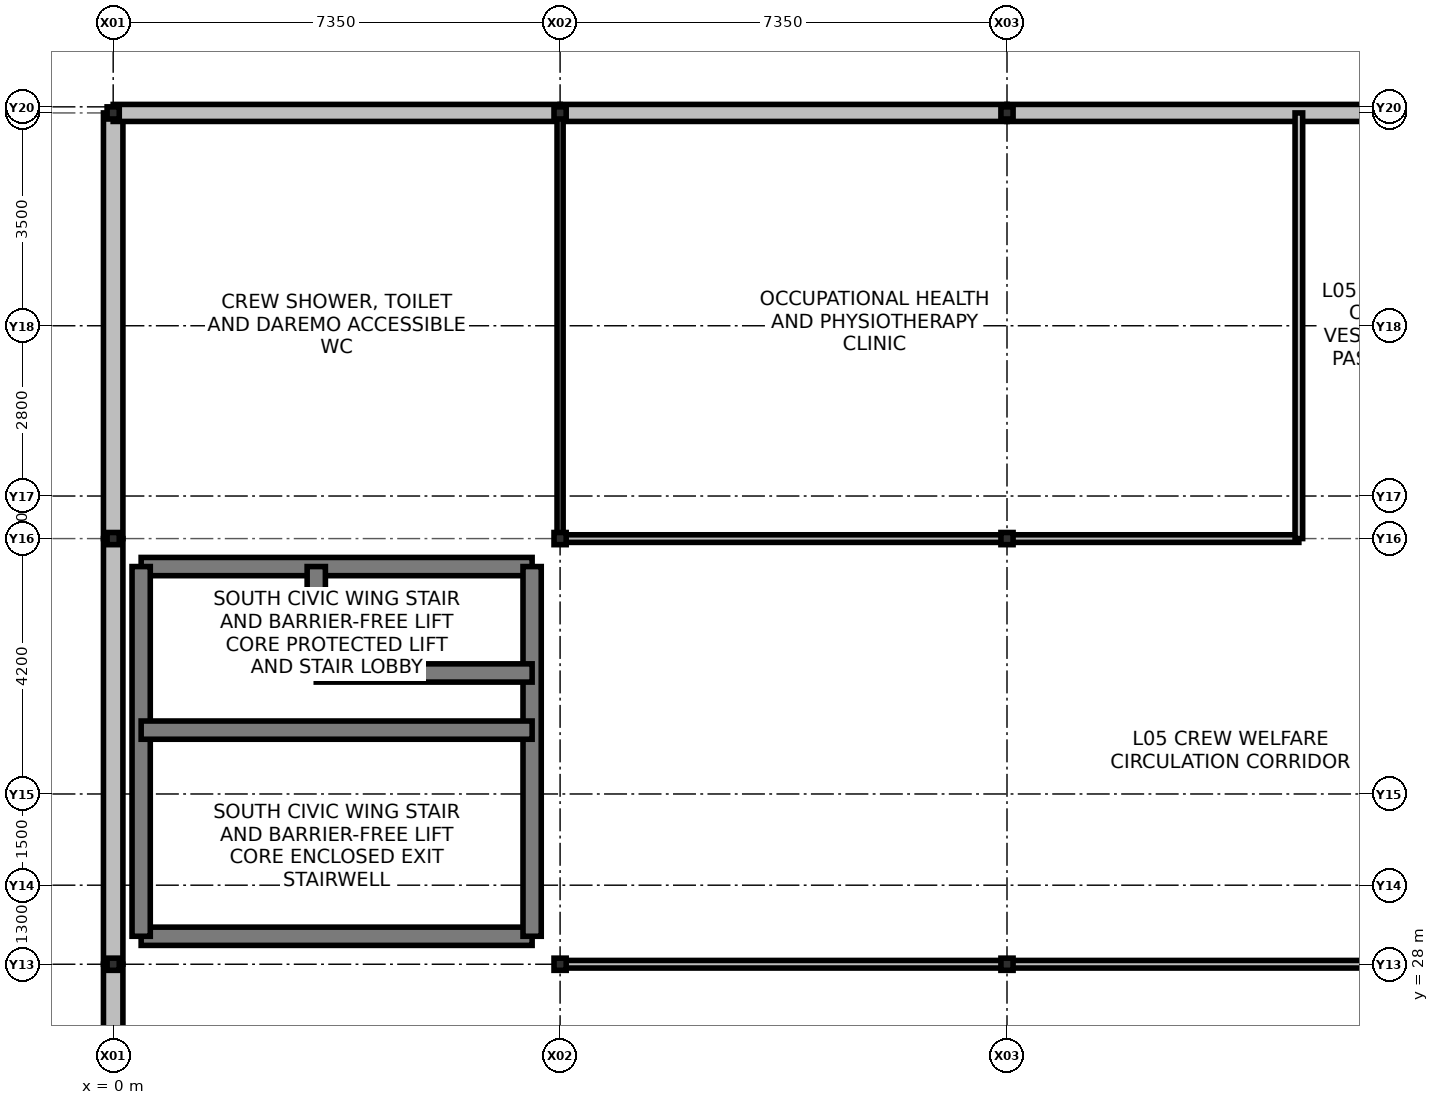
"""IFC4 building model, lengths in metres.
Left out: names, types, materials, properties, quantities, classifications, styles, units other than length and angle.
Written with IfcOpenShell. Run it as: python <this file> out.ifc"""

import sys

from ifc_helpers import new_model, si_unit, direction, frame, frame_2d, origin, origin_2d, place, context, subcontext, project, spatial, rectangle, i_section, extrude, element, fill, save


model = new_model("IFC4")
c1 = context("Model", 3, precision=1e-05, world=origin(), true_north=direction((0.0, 1.0)))
c2 = subcontext(c1, "Body", "Model", "MODEL_VIEW")
j1 = project(units=[si_unit("LENGTHUNIT", "METRE"), si_unit("PLANEANGLEUNIT", "RADIAN")], contexts=[c1])
p1 = place(None, origin())
s1 = spatial("IfcSite", under=j1, at=p1, CompositionType="ELEMENT")
p2 = place(p1, origin())
s2 = spatial("IfcBuilding", under=s1, at=p2, CompositionType="ELEMENT")
p3 = place(p2, frame((0.0, 0.0, 19.5)))
s3 = spatial("IfcBuildingStorey", under=s2, at=p3, CompositionType="ELEMENT", Elevation=19.5)
for number, where, z_axis, x_axis in (
    (1, (0.0, 28.0, 0.0), (0.0, 0.0, 1.0), (1.0, 0.0, 0.0)),
    (2, (0.0, 35.0, 0.0), (0.0, 0.0, 1.0), (1.0, 0.0, 0.0)),
    (3, (0.0, 42.0, 0.0), (0.0, 0.0, 1.0), (1.0, 0.0, 0.0)),
    (4, (7.35, 28.0, 0.0), (0.0, 0.0, 1.0), (1.0, 0.0, 0.0)),
    (5, (7.35, 35.0, 0.0), (0.0, 0.0, 1.0), (1.0, 0.0, 0.0)),
    (6, (7.35, 42.0, 0.0), (0.0, 0.0, 1.0), (1.0, 0.0, 0.0)),
    (7, (14.7, 28.0, 0.0), (0.0, 0.0, 1.0), (1.0, 0.0, 0.0)),
    (8, (14.7, 35.0, 0.0), (0.0, 0.0, 1.0), (1.0, 0.0, 0.0)),
    (9, (14.7, 42.0, 0.0), (0.0, 0.0, 1.0), (1.0, 0.0, 0.0)),
):
    element("IfcColumn", number, at=place(p3, frame(where, z_axis=z_axis, x_axis=x_axis)), inside=s3, PredefinedType="COLUMN", context=c2, shape_type="SweptSolid", body=[
        extrude(i_section(OverallWidth=0.2, OverallDepth=0.2, WebThickness=0.008, FlangeThickness=0.012, at=origin_2d()), origin(), (0.0, 0.0, 1.0), 4.2),
    ])
p4 = place(p3, frame((0.0, 21.0, 0.0), z_axis=(0.0, 0.0, 1.0), x_axis=(0.0, 1.0, 0.0)))
e10 = element("IfcWall", 10, at=p4, inside=s3, PredefinedType="SOLIDWALL", context=c2, shape_type="SweptSolid", body=[
    extrude(rectangle(XDim=7.0, YDim=0.32, at=frame_2d((3.5, 0.0))), origin(), (0.0, 0.0, 1.0), 3.48),
])
p5 = place(p4, frame((2.2, 0.0, 0.9)))
e11 = element("IfcOpeningElement", 11, at=p5, cuts=e10, PredefinedType="OPENING", context=c2, shape_type="SweptSolid", body=[
    extrude(rectangle(XDim=2.1, YDim=2.1, at=frame_2d((1.05, 1.05))), frame((0.0, 0.17, 0.0), z_axis=(0.0, -1.0, 0.0), x_axis=(1.0, 0.0, 0.0)), (0.0, 0.0, 1.0), 0.34),
])
p6 = place(p3, frame((0.0, 28.0, 0.0), z_axis=(0.0, 0.0, 1.0), x_axis=(0.0, 1.0, 0.0)))
e12 = element("IfcWall", 12, at=p6, inside=s3, PredefinedType="SOLIDWALL", context=c2, shape_type="SweptSolid", body=[
    extrude(rectangle(XDim=7.0, YDim=0.32, at=frame_2d((3.5, 0.0))), origin(), (0.0, 0.0, 1.0), 3.48),
])
p7 = place(p6, frame((2.2, 0.0, 0.9)))
e13 = element("IfcOpeningElement", 13, at=p7, cuts=e12, PredefinedType="OPENING", context=c2, shape_type="SweptSolid", body=[
    extrude(rectangle(XDim=3.0, YDim=1.8, at=frame_2d((1.5, 0.9))), frame((0.0, 0.17, 0.0), z_axis=(0.0, -1.0, 0.0), x_axis=(1.0, 0.0, 0.0)), (0.0, 0.0, 1.0), 0.34),
])
p8 = place(p3, frame((0.0, 35.0, 0.0), z_axis=(0.0, 0.0, 1.0), x_axis=(0.0, 1.0, 0.0)))
e14 = element("IfcWall", 14, at=p8, inside=s3, PredefinedType="SOLIDWALL", context=c2, shape_type="SweptSolid", body=[
    extrude(rectangle(XDim=7.0, YDim=0.32, at=frame_2d((3.5, 0.0))), origin(), (0.0, 0.0, 1.0), 3.48),
])
p9 = place(p8, frame((2.2, 0.0, 0.9)))
e15 = element("IfcOpeningElement", 15, at=p9, cuts=e14, PredefinedType="OPENING", context=c2, shape_type="SweptSolid", body=[
    extrude(rectangle(XDim=1.65, YDim=1.95, at=frame_2d((0.825, 0.975))), frame((0.0, 0.17, 0.0), z_axis=(0.0, -1.0, 0.0), x_axis=(1.0, 0.0, 0.0)), (0.0, 0.0, 1.0), 0.34),
])
p10 = place(p3, frame((0.0, 42.0, 0.0), z_axis=(0.0, 0.0, 1.0), x_axis=(1.0, 0.0, 0.0)))
e16 = element("IfcWall", 16, at=p10, inside=s3, PredefinedType="SOLIDWALL", context=c2, shape_type="SweptSolid", body=[
    extrude(rectangle(XDim=7.35, YDim=0.28, at=frame_2d((3.675, 0.0))), origin(), (0.0, 0.0, 1.0), 3.48),
])
p11 = place(p10, frame((2.4, 0.0, 0.9)))
e17 = element("IfcOpeningElement", 17, at=p11, cuts=e16, PredefinedType="OPENING", context=c2, shape_type="SweptSolid", body=[
    extrude(rectangle(XDim=2.4, YDim=2.1, at=frame_2d((1.2, 1.05))), frame((0.0, 0.15, 0.0), z_axis=(0.0, -1.0, 0.0), x_axis=(1.0, 0.0, 0.0)), (0.0, 0.0, 1.0), 0.3),
])
p12 = place(p3, frame((7.35, 42.0, 0.0), z_axis=(0.0, 0.0, 1.0), x_axis=(1.0, 0.0, 0.0)))
e18 = element("IfcWall", 18, at=p12, inside=s3, PredefinedType="SOLIDWALL", context=c2, shape_type="SweptSolid", body=[
    extrude(rectangle(XDim=7.35, YDim=0.28, at=frame_2d((3.675, 0.0))), origin(), (0.0, 0.0, 1.0), 3.48),
])
p13 = place(p12, frame((2.4, 0.0, 0.9)))
e19 = element("IfcOpeningElement", 19, at=p13, cuts=e18, PredefinedType="OPENING", context=c2, shape_type="SweptSolid", body=[
    extrude(rectangle(XDim=2.6, YDim=2.0, at=frame_2d((1.3, 1.0))), frame((0.0, 0.15, 0.0), z_axis=(0.0, -1.0, 0.0), x_axis=(1.0, 0.0, 0.0)), (0.0, 0.0, 1.0), 0.3),
])
p14 = place(p3, frame((14.7, 42.0, 0.0), z_axis=(0.0, 0.0, 1.0), x_axis=(1.0, 0.0, 0.0)))
e20 = element("IfcWall", 20, at=p14, inside=s3, PredefinedType="SOLIDWALL", context=c2, shape_type="SweptSolid", body=[
    extrude(rectangle(XDim=7.35, YDim=0.28, at=frame_2d((3.675, 0.0))), origin(), (0.0, 0.0, 1.0), 3.48),
])
p15 = place(p14, frame((1.4, 0.0, 0.9)))
e21 = element("IfcOpeningElement", 21, at=p15, cuts=e20, PredefinedType="OPENING", context=c2, shape_type="SweptSolid", body=[
    extrude(rectangle(XDim=2.8, YDim=2.1, at=frame_2d((1.4, 1.05))), frame((0.0, 0.15, 0.0), z_axis=(0.0, -1.0, 0.0), x_axis=(1.0, 0.0, 0.0)), (0.0, 0.0, 1.0), 0.3),
])
p16 = place(p3, frame((0.46, 28.46, 0.0), z_axis=(0.0, 0.0, 1.0), x_axis=(1.0, 0.0, 0.0)))
e22 = element("IfcWall", 22, at=p16, inside=s3, PredefinedType="SHEAR", context=c2, shape_type="SweptSolid", body=[
    extrude(rectangle(XDim=6.43, YDim=0.3, at=frame_2d((3.215, 0.0))), origin(), (0.0, 0.0, 1.0), 3.92),
])
p17 = place(p3, frame((0.46, 34.54, 0.0), z_axis=(0.0, 0.0, 1.0), x_axis=(1.0, 0.0, 0.0)))
e23 = element("IfcWall", 23, at=p17, inside=s3, PredefinedType="SHEAR", context=c2, shape_type="SweptSolid", body=[
    extrude(rectangle(XDim=6.43, YDim=0.3, at=frame_2d((3.215, 0.0))), origin(), (0.0, 0.0, 1.0), 3.92),
])
p18 = place(p17, frame((0.55, 0.0, 0.0)))
e24 = element("IfcOpeningElement", 24, at=p18, cuts=e23, PredefinedType="OPENING", context=c2, shape_type="SweptSolid", body=[
    extrude(rectangle(XDim=1.5, YDim=2.2, at=frame_2d((0.75, 1.1))), frame((0.0, 0.16, 0.0), z_axis=(0.0, -1.0, 0.0), x_axis=(1.0, 0.0, 0.0)), (0.0, 0.0, 1.0), 0.32),
])
for number, where, z_axis, x_axis in (
    (25, (0.46, 28.46, 0.0), (0.0, 0.0, 1.0), (0.0, 1.0, 0.0)),
    (26, (6.89, 28.46, 0.0), (0.0, 0.0, 1.0), (0.0, 1.0, 0.0)),
):
    element("IfcWall", number, at=place(p3, frame(where, z_axis=z_axis, x_axis=x_axis)), inside=s3, PredefinedType="SHEAR", context=c2, shape_type="SweptSolid", body=[
        extrude(rectangle(XDim=6.08, YDim=0.3, at=frame_2d((3.04, 0.0))), origin(), (0.0, 0.0, 1.0), 3.92),
    ])
p19 = place(p3, frame((0.46, 31.85, 0.0), z_axis=(0.0, 0.0, 1.0), x_axis=(1.0, 0.0, 0.0)))
e27 = element("IfcWall", 27, at=p19, inside=s3, PredefinedType="SHEAR", context=c2, shape_type="SweptSolid", body=[
    extrude(rectangle(XDim=6.43, YDim=0.3, at=frame_2d((3.215, 0.0))), origin(), (0.0, 0.0, 1.0), 3.92),
])
p20 = place(p19, frame((0.185, 0.0, 0.0)))
e28 = element("IfcOpeningElement", 28, at=p20, cuts=e27, PredefinedType="OPENING", context=c2, shape_type="SweptSolid", body=[
    extrude(rectangle(XDim=1.05, YDim=2.15, at=frame_2d((0.525, 1.075))), frame((0.0, 0.16, 0.0), z_axis=(0.0, -1.0, 0.0), x_axis=(1.0, 0.0, 0.0)), (0.0, 0.0, 1.0), 0.32),
])
p21 = place(p3, frame((3.34, 32.79, 0.0), z_axis=(0.0, 0.0, 1.0), x_axis=(0.0, 1.0, 0.0)))
e29 = element("IfcWall", 29, at=p21, inside=s3, PredefinedType="SHEAR", context=c2, shape_type="SweptSolid", body=[
    extrude(rectangle(XDim=1.75, YDim=0.3, at=frame_2d((0.875, 0.0))), origin(), (0.0, 0.0, 1.0), 3.92),
])
p22 = place(p3, frame((3.34, 32.79, 0.0), z_axis=(0.0, 0.0, 1.0), x_axis=(1.0, 0.0, 0.0)))
e30 = element("IfcWall", 30, at=p22, inside=s3, PredefinedType="SHEAR", context=c2, shape_type="SweptSolid", body=[
    extrude(rectangle(XDim=3.55, YDim=0.3, at=frame_2d((1.775, 0.0))), origin(), (0.0, 0.0, 1.0), 3.92),
])
p23 = place(p22, frame((0.25, 0.0, 0.0)))
e31 = element("IfcOpeningElement", 31, at=p23, cuts=e30, PredefinedType="OPENING", context=c2, shape_type="SweptSolid", body=[
    extrude(rectangle(XDim=1.1, YDim=2.15, at=frame_2d((0.55, 1.075))), frame((0.0, 0.16, 0.0), z_axis=(0.0, -1.0, 0.0), x_axis=(1.0, 0.0, 0.0)), (0.0, 0.0, 1.0), 0.32),
])
p24 = place(p22, frame((1.75, 0.0, 0.0)))
e32 = element("IfcOpeningElement", 32, at=p24, cuts=e30, PredefinedType="OPENING", context=c2, shape_type="SweptSolid", body=[
    extrude(rectangle(XDim=1.2, YDim=2.2, at=frame_2d((0.6, 1.1))), frame((0.0, 0.16, 0.0), z_axis=(0.0, -1.0, 0.0), x_axis=(1.0, 0.0, 0.0)), (0.0, 0.0, 1.0), 0.32),
])
p25 = place(p3, frame((7.35, 28.0, 0.0), z_axis=(0.0, 0.0, 1.0), x_axis=(1.0, 0.0, 0.0)))
e33 = element("IfcWall", 33, at=p25, inside=s3, PredefinedType="PARTITIONING", context=c2, shape_type="SweptSolid", body=[
    extrude(rectangle(XDim=22.05, YDim=0.125, at=frame_2d((11.025, 0.0))), origin(), (0.0, 0.0, 1.0), 3.25),
])
p26 = place(p25, frame((4.0, 0.0, 0.0)))
e34 = element("IfcOpeningElement", 34, at=p26, cuts=e33, PredefinedType="OPENING", context=c2, shape_type="SweptSolid", body=[
    extrude(rectangle(XDim=1.35, YDim=2.2, at=frame_2d((0.675, 1.1))), frame((0.0, 0.072, 0.0), z_axis=(0.0, -1.0, 0.0), x_axis=(1.0, 0.0, 0.0)), (0.0, 0.0, 1.0), 0.145),
])
p27 = place(p25, frame((17.5, 0.0, 0.0)))
e35 = element("IfcOpeningElement", 35, at=p27, cuts=e33, PredefinedType="OPENING", context=c2, shape_type="SweptSolid", body=[
    extrude(rectangle(XDim=1.0, YDim=2.2, at=frame_2d((0.5, 1.1))), frame((0.0, 0.072, 0.0), z_axis=(0.0, -1.0, 0.0), x_axis=(1.0, 0.0, 0.0)), (0.0, 0.0, 1.0), 0.145),
])
p28 = place(p3, frame((7.35, 35.0, 0.0), z_axis=(0.0, 0.0, 1.0), x_axis=(1.0, 0.0, 0.0)))
e36 = element("IfcWall", 36, at=p28, inside=s3, PredefinedType="PARTITIONING", context=c2, shape_type="SweptSolid", body=[
    extrude(rectangle(XDim=12.15, YDim=0.125, at=frame_2d((6.075, 0.0))), origin(), (0.0, 0.0, 1.0), 3.25),
])
p29 = place(p28, frame((4.0, 0.0, 0.0)))
e37 = element("IfcOpeningElement", 37, at=p29, cuts=e36, PredefinedType="OPENING", context=c2, shape_type="SweptSolid", body=[
    extrude(rectangle(XDim=1.25, YDim=2.15, at=frame_2d((0.625, 1.075))), frame((0.0, 0.072, 0.0), z_axis=(0.0, -1.0, 0.0), x_axis=(1.0, 0.0, 0.0)), (0.0, 0.0, 1.0), 0.145),
])
p30 = place(p3, frame((19.5, 35.0, 0.0), z_axis=(0.0, 0.0, 1.0), x_axis=(0.0, 1.0, 0.0)))
e38 = element("IfcWall", 38, at=p30, inside=s3, PredefinedType="PARTITIONING", context=c2, shape_type="SweptSolid", body=[
    extrude(rectangle(XDim=7.0, YDim=0.125, at=frame_2d((3.5, 0.0))), origin(), (0.0, 0.0, 1.0), 3.25),
])
p31 = place(p3, frame((7.35, 35.0, 0.0), z_axis=(0.0, 0.0, 1.0), x_axis=(0.0, 1.0, 0.0)))
e39 = element("IfcWall", 39, at=p31, inside=s3, PredefinedType="PARTITIONING", context=c2, shape_type="SweptSolid", body=[
    extrude(rectangle(XDim=7.0, YDim=0.1, at=frame_2d((3.5, 0.0))), origin(), (0.0, 0.0, 1.0), 3.25),
])
p32 = place(p31, frame((2.8, 0.0, 0.0)))
e40 = element("IfcOpeningElement", 40, at=p32, cuts=e39, PredefinedType="OPENING", context=c2, shape_type="SweptSolid", body=[
    extrude(rectangle(XDim=0.9, YDim=2.1, at=frame_2d((0.45, 1.05))), frame((0.0, 0.06, 0.0), z_axis=(0.0, -1.0, 0.0), x_axis=(1.0, 0.0, 0.0)), (0.0, 0.0, 1.0), 0.12),
])
p33 = place(p7, origin())
e41 = element("IfcWindow", 41, at=p33, inside=s3, PartitioningType="SINGLE_PANEL", PredefinedType="WINDOW", context=c2, shape_type="SweptSolid", body=[
    extrude(rectangle(XDim=3.0, YDim=1.8, at=frame_2d((1.5, 0.9))), frame((0.0, 0.03, 0.0), z_axis=(0.0, -1.0, 0.0), x_axis=(1.0, 0.0, 0.0)), (0.0, 0.0, 1.0), 0.06),
])
fill(e13, e41)
p34 = place(p9, origin())
e42 = element("IfcWindow", 42, at=p34, inside=s3, PartitioningType="SINGLE_PANEL", PredefinedType="WINDOW", context=c2, shape_type="SweptSolid", body=[
    extrude(rectangle(XDim=1.65, YDim=1.95, at=frame_2d((0.825, 0.975))), frame((0.0, 0.03, 0.0), z_axis=(0.0, -1.0, 0.0), x_axis=(1.0, 0.0, 0.0)), (0.0, 0.0, 1.0), 0.06),
])
fill(e15, e42)
p35 = place(p11, origin())
e43 = element("IfcWindow", 43, at=p35, inside=s3, PartitioningType="SINGLE_PANEL", PredefinedType="WINDOW", context=c2, shape_type="SweptSolid", body=[
    extrude(rectangle(XDim=2.4, YDim=2.1, at=frame_2d((1.2, 1.05))), frame((0.0, 0.03, 0.0), z_axis=(0.0, -1.0, 0.0), x_axis=(1.0, 0.0, 0.0)), (0.0, 0.0, 1.0), 0.06),
])
fill(e17, e43)
p36 = place(p13, origin())
e44 = element("IfcWindow", 44, at=p36, inside=s3, PartitioningType="SINGLE_PANEL", PredefinedType="WINDOW", context=c2, shape_type="SweptSolid", body=[
    extrude(rectangle(XDim=2.6, YDim=2.0, at=frame_2d((1.3, 1.0))), frame((0.0, 0.03, 0.0), z_axis=(0.0, -1.0, 0.0), x_axis=(1.0, 0.0, 0.0)), (0.0, 0.0, 1.0), 0.06),
])
fill(e19, e44)
p37 = place(p15, origin())
e45 = element("IfcWindow", 45, at=p37, inside=s3, PartitioningType="SINGLE_PANEL", PredefinedType="WINDOW", context=c2, shape_type="SweptSolid", body=[
    extrude(rectangle(XDim=2.8, YDim=2.1, at=frame_2d((1.4, 1.05))), frame((0.0, 0.03, 0.0), z_axis=(0.0, -1.0, 0.0), x_axis=(1.0, 0.0, 0.0)), (0.0, 0.0, 1.0), 0.06),
])
fill(e21, e45)
p38 = place(p20, origin())
e46 = element("IfcDoor", 46, at=p38, inside=s3, OperationType="SINGLE_SWING_RIGHT", PredefinedType="DOOR", context=c2, shape_type="SweptSolid", body=[
    extrude(rectangle(XDim=1.05, YDim=2.15, at=frame_2d((0.525, 1.075))), frame((0.0, 0.025, 0.0), z_axis=(0.0, -1.0, 0.0), x_axis=(1.0, 0.0, 0.0)), (0.0, 0.0, 1.0), 0.05),
])
fill(e28, e46)
p39 = place(p18, origin())
e47 = element("IfcDoor", 47, at=p39, inside=s3, OperationType="DOUBLE_DOOR_SINGLE_SWING", PredefinedType="DOOR", context=c2, shape_type="SweptSolid", body=[
    extrude(rectangle(XDim=1.5, YDim=2.2, at=frame_2d((0.75, 1.1))), frame((0.0, 0.025, 0.0), z_axis=(0.0, -1.0, 0.0), x_axis=(1.0, 0.0, 0.0)), (0.0, 0.0, 1.0), 0.05),
])
fill(e24, e47)
p40 = place(p23, origin())
e48 = element("IfcDoor", 48, at=p40, inside=s3, OperationType="SLIDING_TO_LEFT", PredefinedType="DOOR", context=c2, shape_type="SweptSolid", body=[
    extrude(rectangle(XDim=1.1, YDim=2.15, at=frame_2d((0.55, 1.075))), frame((0.0, 0.025, 0.0), z_axis=(0.0, -1.0, 0.0), x_axis=(1.0, 0.0, 0.0)), (0.0, 0.0, 1.0), 0.05),
])
fill(e31, e48)
p41 = place(p24, origin())
e49 = element("IfcDoor", 49, at=p41, inside=s3, OperationType="SLIDING_TO_RIGHT", PredefinedType="DOOR", context=c2, shape_type="SweptSolid", body=[
    extrude(rectangle(XDim=1.2, YDim=2.2, at=frame_2d((0.6, 1.1))), frame((0.0, 0.025, 0.0), z_axis=(0.0, -1.0, 0.0), x_axis=(1.0, 0.0, 0.0)), (0.0, 0.0, 1.0), 0.05),
])
fill(e32, e49)
p42 = place(p26, origin())
e50 = element("IfcDoor", 50, at=p42, inside=s3, OperationType="DOUBLE_DOOR_SINGLE_SWING", PredefinedType="DOOR", context=c2, shape_type="SweptSolid", body=[
    extrude(rectangle(XDim=1.35, YDim=2.2, at=frame_2d((0.675, 1.1))), frame((0.0, 0.025, 0.0), z_axis=(0.0, -1.0, 0.0), x_axis=(1.0, 0.0, 0.0)), (0.0, 0.0, 1.0), 0.05),
])
fill(e34, e50)
p43 = place(p29, origin())
e51 = element("IfcDoor", 51, at=p43, inside=s3, OperationType="SINGLE_SWING_LEFT", PredefinedType="DOOR", context=c2, shape_type="SweptSolid", body=[
    extrude(rectangle(XDim=1.25, YDim=2.15, at=frame_2d((0.625, 1.075))), frame((0.0, 0.025, 0.0), z_axis=(0.0, -1.0, 0.0), x_axis=(1.0, 0.0, 0.0)), (0.0, 0.0, 1.0), 0.05),
])
fill(e37, e51)
p44 = place(p32, origin())
e52 = element("IfcDoor", 52, at=p44, inside=s3, OperationType="SINGLE_SWING_RIGHT", PredefinedType="DOOR", context=c2, shape_type="SweptSolid", body=[
    extrude(rectangle(XDim=0.9, YDim=2.1, at=frame_2d((0.45, 1.05))), frame((0.0, 0.025, 0.0), z_axis=(0.0, -1.0, 0.0), x_axis=(1.0, 0.0, 0.0)), (0.0, 0.0, 1.0), 0.05),
])
fill(e40, e52)
save(model, sys.argv[1])
